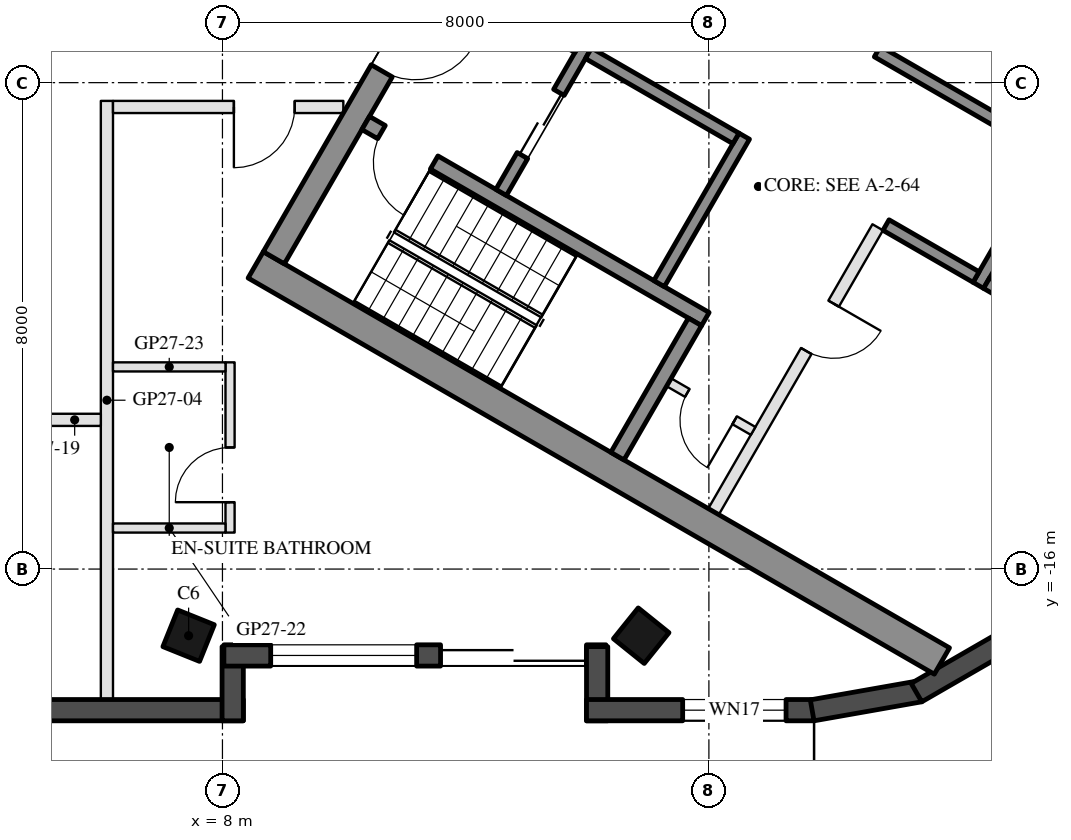
"""IFC4 building model, lengths in metres.
Left out: names, types, materials, properties, quantities, classifications, styles, units other than length and angle.
Written with IfcOpenShell. Run it as: python <this file> out.ifc"""

import sys

from ifc_helpers import new_model, si_unit, direction, frame, frame_2d, origin, origin_2d, place, context, subcontext, project, spatial, rectangle, hollow_rectangle, extrude, boolean, halfspace, element, fill, save


model = new_model("IFC4")
c1 = context("Model", 3, precision=1e-05, world=origin(), true_north=direction((0.0, 1.0)))
c2 = subcontext(c1, "Body", "Model", "MODEL_VIEW")
j1 = project(units=[si_unit("LENGTHUNIT", "METRE"), si_unit("PLANEANGLEUNIT", "RADIAN")], contexts=[c1])
p1 = place(None, origin())
s1 = spatial("IfcSite", under=j1, at=p1, CompositionType="ELEMENT")
p2 = place(p1, origin())
s2 = spatial("IfcBuilding", under=s1, at=p2, CompositionType="ELEMENT")
p3 = place(p2, frame((0.0, 0.0, 276.3)))
s3 = spatial("IfcBuildingStorey", under=s2, at=p3, CompositionType="ELEMENT", Elevation=276.3)
p4 = place(p3, frame((7.444, -17.096, 0.0), z_axis=(-0.060871062735, 0.151168564354, 0.986632038235), x_axis=(0.998135304591, 0.004721094283, 0.0608574153)))
e1 = element("IfcColumn", 1, at=p4, inside=s3, PredefinedType="COLUMN", context=c2, shape_type="SweptSolid", body=[
    boolean("DIFFERENCE", boolean("DIFFERENCE", extrude(hollow_rectangle(XDim=0.65, YDim=0.65, WallThickness=0.03, at=origin_2d()), origin(), (0.0, 0.0, 1.0), 3.75), halfspace(frame((0.0, 0.0, 0.04), z_axis=(0.0, 0.0, 1.0), x_axis=(1.0, 0.0, 0.0)), True)), halfspace(frame((0.0, 0.0, 3.71), z_axis=(0.0, 0.0, 1.0), x_axis=(1.0, 0.0, 0.0)), False)),
])
p5 = place(p3, frame((14.887, -17.096, 0.0), z_axis=(-0.121071080606, 0.15033532041, 0.981193704055), x_axis=(0.992604301044, 0.009512970783, 0.12102150609)))
e2 = element("IfcColumn", 2, at=p5, inside=s3, PredefinedType="COLUMN", context=c2, shape_type="SweptSolid", body=[
    boolean("DIFFERENCE", boolean("DIFFERENCE", extrude(hollow_rectangle(XDim=0.65, YDim=0.65, WallThickness=0.03, at=origin_2d()), origin(), (0.0, 0.0, 1.0), 3.771), halfspace(frame((0.0, 0.0, 0.047), z_axis=(0.0, 0.0, 1.0), x_axis=(1.0, 0.0, 0.0)), True)), halfspace(frame((0.0, 0.0, 3.724), z_axis=(0.0, 0.0, 1.0), x_axis=(1.0, 0.0, 0.0)), False)),
])
p6 = place(p3, frame((22.38, -12.921, 0.0), z_axis=(-0.190406849863, 0.109944185114, 0.975529347424), x_axis=(-0.499999219142, -0.866025854536, 1.1512328e-05)))
e3 = element("IfcColumn", 3, at=p6, inside=s3, PredefinedType="COLUMN", context=c2, shape_type="SweptSolid", body=[
    boolean("DIFFERENCE", boolean("DIFFERENCE", extrude(hollow_rectangle(XDim=2.0, YDim=2.0, WallThickness=0.05, at=origin_2d()), origin(), (0.0, 0.0, 1.0), 3.793), halfspace(frame((0.0, 0.0, 0.113), z_axis=(0.0, 0.0, 1.0), x_axis=(1.0, 0.0, 0.0)), True)), halfspace(frame((0.0, 0.0, 3.679), z_axis=(0.0, 0.0, 1.0), x_axis=(1.0, 0.0, 0.0)), False)),
])
p7 = place(p3, frame((-0.9, -18.321, 0.0), z_axis=(0.0, 0.0, 1.0), x_axis=(1.0, 0.0, 0.0)))
e4 = element("IfcWall", 4, at=p7, inside=s3, PredefinedType="SOLIDWALL", context=c2, shape_type="SweptSolid", body=[
    extrude(rectangle(XDim=9.243, YDim=0.35, at=frame_2d((4.622, 0.0))), origin(), (0.0, 0.0, 1.0), 3.55),
])
p8 = place(p7, frame((1.615, 0.0, 0.0)))
e5 = element("IfcOpeningElement", 5, at=p8, cuts=e4, PredefinedType="OPENING", context=c2, shape_type="SweptSolid", body=[
    extrude(rectangle(XDim=1.4, YDim=2.4, at=frame_2d((0.7, 1.2))), frame((0.0, 0.185, 0.0), z_axis=(0.0, -1.0, 0.0), x_axis=(1.0, 0.0, 0.0)), (0.0, 0.0, 1.0), 0.37),
])
p9 = place(p7, frame((4.5, 0.0, 0.0)))
e6 = element("IfcOpeningElement", 6, at=p9, cuts=e4, PredefinedType="OPENING", context=c2, shape_type="SweptSolid", body=[
    extrude(rectangle(XDim=1.5, YDim=2.4, at=frame_2d((0.75, 1.2))), frame((0.0, 0.185, 0.0), z_axis=(0.0, -1.0, 0.0), x_axis=(1.0, 0.0, 0.0)), (0.0, 0.0, 1.0), 0.37),
])
p10 = place(p3, frame((8.169, -18.496, 0.0), z_axis=(0.0, 0.0, 1.0), x_axis=(0.0, 1.0, 0.0)))
e7 = element("IfcWall", 7, at=p10, inside=s3, PredefinedType="SOLIDWALL", context=c2, shape_type="SweptSolid", body=[
    extrude(rectangle(XDim=1.22, YDim=0.35, at=frame_2d((0.61, 0.0))), origin(), (0.0, 0.0, 1.0), 3.55),
])
p11 = place(p3, frame((8.024, -17.421, 0.0), z_axis=(0.0, 0.0, 1.0), x_axis=(1.0, 0.0, 0.0)))
e8 = element("IfcWall", 8, at=p11, inside=s3, PredefinedType="SOLIDWALL", context=c2, shape_type="SweptSolid", body=[
    extrude(rectangle(XDim=6.283, YDim=0.35, at=frame_2d((3.142, 0.0))), origin(), (0.0, 0.0, 1.0), 3.55),
])
p12 = place(p11, frame((3.563, 0.0, 0.0)))
e9 = element("IfcOpeningElement", 9, at=p12, cuts=e8, PredefinedType="OPENING", context=c2, shape_type="SweptSolid", body=[
    extrude(rectangle(XDim=2.4, YDim=2.4, at=frame_2d((1.2, 1.2))), frame((0.0, 0.185, 0.0), z_axis=(0.0, -1.0, 0.0), x_axis=(1.0, 0.0, 0.0)), (0.0, 0.0, 1.0), 0.37),
])
p13 = place(p11, frame((0.77, 0.0, 0.3)))
e10 = element("IfcOpeningElement", 10, at=p13, cuts=e8, PredefinedType="OPENING", context=c2, shape_type="SweptSolid", body=[
    extrude(rectangle(XDim=2.4, YDim=2.65, at=frame_2d((1.2, 1.325))), frame((0.0, 0.185, 0.0), z_axis=(0.0, -1.0, 0.0), x_axis=(1.0, 0.0, 0.0)), (0.0, 0.0, 1.0), 0.37),
])
p14 = place(p3, frame((14.162, -17.276, 0.0), z_axis=(0.0, 0.0, 1.0), x_axis=(0.0, -1.0, 0.0)))
e11 = element("IfcWall", 11, at=p14, inside=s3, PredefinedType="SOLIDWALL", context=c2, shape_type="SweptSolid", body=[
    extrude(rectangle(XDim=1.22, YDim=0.35, at=frame_2d((0.61, 0.0))), origin(), (0.0, 0.0, 1.0), 3.55),
])
p15 = place(p3, frame((13.987, -18.321, 0.0), z_axis=(0.0, 0.0, 1.0), x_axis=(1.0, 0.0, 0.0)))
e12 = element("IfcWall", 12, at=p15, inside=s3, PredefinedType="SOLIDWALL", context=c2, shape_type="SweptSolid", body=[
    extrude(rectangle(XDim=3.742, YDim=0.35, at=frame_2d((1.871, 0.0))), origin(), (0.0, 0.0, 1.0), 3.55),
])
p16 = place(p15, frame((1.582, 0.0, 0.3)))
e13 = element("IfcOpeningElement", 13, at=p16, cuts=e12, PredefinedType="OPENING", context=c2, shape_type="SweptSolid", body=[
    extrude(rectangle(XDim=1.7, YDim=2.65, at=frame_2d((0.85, 1.325))), frame((0.0, 0.185, 0.0), z_axis=(0.0, -1.0, 0.0), x_axis=(1.0, 0.0, 0.0)), (0.0, 0.0, 1.0), 0.37),
])
p17 = place(p3, frame((17.698, -18.323, 0.0), z_axis=(0.0, 0.0, 1.0), x_axis=(0.984810858511, 0.173630564586, 0.0)))
e14 = element("IfcWall", 14, at=p17, inside=s3, PredefinedType="SOLIDWALL", context=c2, shape_type="SweptSolid", body=[
    extrude(rectangle(XDim=1.8, YDim=0.35, at=frame_2d((0.9, 0.0))), origin(), (0.0, 0.0, 1.0), 3.55),
])
p18 = place(p3, frame((19.414, -18.032, 0.0), z_axis=(0.0, 0.0, 1.0), x_axis=(0.866047807691, 0.499961193289, 0.0)))
e15 = element("IfcWall", 15, at=p18, inside=s3, PredefinedType="SOLIDWALL", context=c2, shape_type="SweptSolid", body=[
    extrude(rectangle(XDim=1.8, YDim=0.35, at=frame_2d((0.9, 0.0))), origin(), (0.0, 0.0, 1.0), 3.55),
])
for number, where, z_axis, x_axis in (
    (16, (8.547, -10.997, 0.0), (0.0, 0.0, 1.0), (0.866, -0.5, 0.0)),
    (17, (13.797, -1.903, 0.0), (0.0, 0.0, 1.0), (0.866, -0.5, 0.0)),
):
    element("IfcWall", number, at=place(p3, frame(where, z_axis=z_axis, x_axis=x_axis)), inside=s3, PredefinedType="SHEAR", context=c2, shape_type="SweptSolid", body=[
        extrude(rectangle(XDim=13.031, YDim=0.5, at=frame_2d((6.516, 0.0))), origin(), (0.0, 0.0, 1.0), 3.5),
    ])
p19 = place(p3, frame((8.845, -10.88, 0.0), z_axis=(0.0, 0.0, 1.0), x_axis=(0.500004234368, 0.866022959057, 0.0)))
e18 = element("IfcWall", 18, at=p19, inside=s3, PredefinedType="SHEAR", context=c2, shape_type="SweptSolid", body=[
    extrude(rectangle(XDim=10.0, YDim=0.4, at=frame_2d((5.0, 0.0))), origin(), (0.0, 0.0, 1.0), 3.5),
])
p20 = place(p19, frame((3.55, 0.0, 0.0)))
e19 = element("IfcOpeningElement", 19, at=p20, cuts=e18, PredefinedType="OPENING", context=c2, shape_type="SweptSolid", body=[
    extrude(rectangle(XDim=1.1, YDim=2.1, at=frame_2d((0.55, 1.05))), frame((0.0, 0.21, 0.0), z_axis=(0.0, -1.0, 0.0), x_axis=(1.0, 0.0, 0.0)), (0.0, 0.0, 1.0), 0.42),
])
p21 = place(p19, frame((5.85, 0.0, 0.0)))
e20 = element("IfcOpeningElement", 20, at=p21, cuts=e18, PredefinedType="OPENING", context=c2, shape_type="SweptSolid", body=[
    extrude(rectangle(XDim=1.4, YDim=2.1, at=frame_2d((0.7, 1.05))), frame((0.0, 0.21, 0.0), z_axis=(0.0, -1.0, 0.0), x_axis=(1.0, 0.0, 0.0)), (0.0, 0.0, 1.0), 0.42),
])
p22 = place(p3, frame((10.356, -8.664, 0.0), z_axis=(0.0, 0.0, 1.0), x_axis=(0.866028629588, -0.499994412703, 0.0)))
e21 = element("IfcWall", 21, at=p22, inside=s3, PredefinedType="SHEAR", context=c2, shape_type="SweptSolid", body=[
    extrude(rectangle(XDim=6.45, YDim=0.25, at=frame_2d((3.225, 0.0))), origin(), (0.0, 0.0, 1.0), 3.5),
])
p23 = place(p22, frame((0.3, 0.0, 0.0)))
e22 = element("IfcOpeningElement", 22, at=p23, cuts=e21, PredefinedType="OPENING", context=c2, shape_type="SweptSolid", body=[
    extrude(rectangle(XDim=1.0, YDim=2.1, at=frame_2d((0.5, 1.05))), frame((0.0, 0.135, 0.0), z_axis=(0.0, -1.0, 0.0), x_axis=(1.0, 0.0, 0.0)), (0.0, 0.0, 1.0), 0.27),
])
p24 = place(p3, frame((14.496, -14.143, 0.0), z_axis=(0.0, 0.0, 1.0), x_axis=(0.500062241894, 0.865989465428, 0.0)))
e23 = element("IfcWall", 23, at=p24, inside=s3, PredefinedType="SHEAR", context=c2, shape_type="SweptSolid", body=[
    extrude(rectangle(XDim=2.55, YDim=0.25, at=frame_2d((1.275, 0.0))), origin(), (0.0, 0.0, 1.0), 3.5),
])
p25 = place(p3, frame((15.181, -11.305, 0.0), z_axis=(0.0, 0.0, 1.0), x_axis=(0.49994636267, 0.866056369097, 0.0)))
e24 = element("IfcWall", 24, at=p25, inside=s3, PredefinedType="SHEAR", context=c2, shape_type="SweptSolid", body=[
    extrude(rectangle(XDim=2.8, YDim=0.2, at=frame_2d((1.4, 0.0))), origin(), (0.0, 0.0, 1.0), 3.5),
])
p26 = place(p3, frame((12.583, -9.805, 0.0), z_axis=(0.0, 0.0, 1.0), x_axis=(0.49994636267, 0.866056369097, 0.0)))
e25 = element("IfcWall", 25, at=p26, inside=s3, PredefinedType="SHEAR", context=c2, shape_type="SweptSolid", body=[
    extrude(rectangle(XDim=2.8, YDim=0.2, at=frame_2d((1.4, 0.0))), origin(), (0.0, 0.0, 1.0), 3.5),
])
p27 = place(p26, frame((0.7, 0.0, 0.0)))
e26 = element("IfcOpeningElement", 26, at=p27, cuts=e25, PredefinedType="OPENING", context=c2, shape_type="SweptSolid", body=[
    extrude(rectangle(XDim=1.2, YDim=2.1, at=frame_2d((0.6, 1.05))), frame((0.0, 0.11, 0.0), z_axis=(0.0, -1.0, 0.0), x_axis=(1.0, 0.0, 0.0)), (0.0, 0.0, 1.0), 0.22),
])
p28 = place(p3, frame((11.768, -6.217, 0.0), z_axis=(0.0, 0.0, 1.0), x_axis=(0.866050077142, -0.499957262057, 0.0)))
e27 = element("IfcWall", 27, at=p28, inside=s3, PredefinedType="SHEAR", context=c2, shape_type="SweptSolid", body=[
    extrude(rectangle(XDim=2.4, YDim=0.2, at=frame_2d((1.2, 0.0))), origin(), (0.0, 0.0, 1.0), 3.5),
])
p29 = place(p3, frame((14.02, -7.517, 0.0), z_axis=(0.0, 0.0, 1.0), x_axis=(0.866034573852, -0.49998411664, 0.0)))
e28 = element("IfcWall", 28, at=p29, inside=s3, PredefinedType="SHEAR", context=c2, shape_type="SweptSolid", body=[
    extrude(rectangle(XDim=2.8, YDim=0.2, at=frame_2d((1.4, 0.0))), origin(), (0.0, 0.0, 1.0), 3.5),
])
p30 = place(p3, frame((12.968, -4.138, 0.0), z_axis=(0.0, 0.0, 1.0), x_axis=(0.866028328073, -0.49999493495, 0.0)))
e29 = element("IfcWall", 29, at=p30, inside=s3, PredefinedType="SHEAR", context=c2, shape_type="SweptSolid", body=[
    extrude(rectangle(XDim=10.16, YDim=0.2, at=frame_2d((5.08, 0.0))), origin(), (0.0, 0.0, 1.0), 3.5),
])
p31 = place(p30, frame((0.62, 0.0, 0.0)))
e30 = element("IfcOpeningElement", 30, at=p31, cuts=e29, PredefinedType="OPENING", context=c2, shape_type="SweptSolid", body=[
    extrude(rectangle(XDim=1.1, YDim=2.1, at=frame_2d((0.55, 1.05))), frame((0.0, 0.11, 0.0), z_axis=(0.0, -1.0, 0.0), x_axis=(1.0, 0.0, 0.0)), (0.0, 0.0, 1.0), 0.22),
])
p32 = place(p30, frame((5.8, 0.0, 0.0)))
e31 = element("IfcOpeningElement", 31, at=p32, cuts=e29, PredefinedType="OPENING", context=c2, shape_type="SweptSolid", body=[
    extrude(rectangle(XDim=0.9, YDim=2.1, at=frame_2d((0.45, 1.05))), frame((0.0, 0.11, 0.0), z_axis=(0.0, -1.0, 0.0), x_axis=(1.0, 0.0, 0.0)), (0.0, 0.0, 1.0), 0.22),
])
p33 = place(p3, frame((20.43, -11.333, 0.0), z_axis=(0.0, 0.0, 1.0), x_axis=(0.500001309137, 0.866024647952, 0.0)))
e32 = element("IfcWall", 32, at=p33, inside=s3, PredefinedType="SHEAR", context=c2, shape_type="SweptSolid", body=[
    extrude(rectangle(XDim=2.4, YDim=0.2, at=frame_2d((1.2, 0.0))), origin(), (0.0, 0.0, 1.0), 3.5),
])
p34 = place(p33, frame((0.85, 0.0, 0.0)))
e33 = element("IfcOpeningElement", 33, at=p34, cuts=e32, PredefinedType="OPENING", context=c2, shape_type="SweptSolid", body=[
    extrude(rectangle(XDim=0.9, YDim=2.1, at=frame_2d((0.45, 1.05))), frame((0.0, 0.11, 0.0), z_axis=(0.0, -1.0, 0.0), x_axis=(1.0, 0.0, 0.0)), (0.0, 0.0, 1.0), 0.22),
])
p35 = place(p3, frame((18.913, -10.342, 0.0), z_axis=(0.0, 0.0, 1.0), x_axis=(0.866038183914, -0.499977863513, 0.0)))
e34 = element("IfcWall", 34, at=p35, inside=s3, PredefinedType="SHEAR", context=c2, shape_type="SweptSolid", body=[
    extrude(rectangle(XDim=1.71, YDim=0.2, at=frame_2d((0.855, 0.0))), origin(), (0.0, 0.0, 1.0), 3.5),
])
p36 = place(p3, frame((20.567, -11.297, 0.0), z_axis=(0.0, 0.0, 1.0), x_axis=(0.866094443108, -0.499880401313, 0.0)))
e35 = element("IfcWall", 35, at=p36, inside=s3, PredefinedType="SHEAR", context=c2, shape_type="SweptSolid", body=[
    extrude(rectangle(XDim=1.383, YDim=0.2, at=frame_2d((0.691, 0.0))), origin(), (0.0, 0.0, 1.0), 3.5),
])
p37 = place(p3, frame((16.076, -15.055, 0.0), z_axis=(0.0, 0.0, 1.0), x_axis=(0.499995103361, 0.866028230842, 0.0)))
e36 = element("IfcWall", 36, at=p37, inside=s3, PredefinedType="PARTITIONING", context=c2, shape_type="SweptSolid", body=[
    extrude(rectangle(XDim=5.4, YDim=0.2, at=frame_2d((2.7, 0.0))), origin(), (0.0, 0.0, 1.0), 3.5),
])
p38 = place(p37, frame((3.05, 0.0, 0.0)))
e37 = element("IfcOpeningElement", 37, at=p38, cuts=e36, PredefinedType="OPENING", context=c2, shape_type="SweptSolid", body=[
    extrude(rectangle(XDim=0.9, YDim=2.1, at=frame_2d((0.45, 1.05))), frame((0.0, 0.11, 0.0), z_axis=(0.0, -1.0, 0.0), x_axis=(1.0, 0.0, 0.0)), (0.0, 0.0, 1.0), 0.22),
])
p39 = place(p3, frame((15.342, -12.928, 0.0), z_axis=(0.0, 0.0, 1.0), x_axis=(0.865989903783, -0.500061482766, 0.0)))
e38 = element("IfcWall", 38, at=p39, inside=s3, PredefinedType="PARTITIONING", context=c2, shape_type="SweptSolid", body=[
    extrude(rectangle(XDim=1.6, YDim=0.15, at=frame_2d((0.8, 0.0))), origin(), (0.0, 0.0, 1.0), 3.5),
])
p40 = place(p39, frame((0.35, 0.0, 0.0)))
e39 = element("IfcOpeningElement", 39, at=p40, cuts=e38, PredefinedType="OPENING", context=c2, shape_type="SweptSolid", body=[
    extrude(rectangle(XDim=0.9, YDim=2.1, at=frame_2d((0.45, 1.05))), frame((0.0, 0.085, 0.0), z_axis=(0.0, -1.0, 0.0), x_axis=(1.0, 0.0, 0.0)), (0.0, 0.0, 1.0), 0.17),
])
p41 = place(p3, frame((6.1, -18.146, 0.0), z_axis=(0.0, 0.0, 1.0), x_axis=(0.0, 1.0, 0.0)))
e40 = element("IfcWall", 40, at=p41, inside=s3, PredefinedType="PARTITIONING", context=c2, shape_type="SweptSolid", body=[
    extrude(rectangle(XDim=9.846, YDim=0.2, at=frame_2d((4.923, 0.0))), origin(), (0.0, 0.0, 1.0), 3.1),
])
p42 = place(p3, frame((6.0, -13.546, 0.0), z_axis=(0.0, 0.0, 1.0), x_axis=(-1.0, 0.0, 0.0)))
e41 = element("IfcWall", 41, at=p42, inside=s3, PredefinedType="PARTITIONING", context=c2, shape_type="SweptSolid", body=[
    extrude(rectangle(XDim=3.586, YDim=0.2, at=frame_2d((1.793, 0.0))), origin(), (0.0, 0.0, 1.0), 3.05),
])
p43 = place(p42, frame((1.293, 0.0, 0.0)))
e42 = element("IfcOpeningElement", 42, at=p43, cuts=e41, PredefinedType="OPENING", context=c2, shape_type="SweptSolid", body=[
    extrude(rectangle(XDim=1.0, YDim=2.1, at=frame_2d((0.5, 1.05))), frame((0.0, 0.11, 0.0), z_axis=(0.0, -1.0, 0.0), x_axis=(1.0, 0.0, 0.0)), (0.0, 0.0, 1.0), 0.22),
])
p44 = place(p3, frame((9.988, -8.4, 0.0), z_axis=(0.0, 0.0, 1.0), x_axis=(-1.0, 0.0, 0.0)))
e43 = element("IfcWall", 43, at=p44, inside=s3, PredefinedType="PARTITIONING", context=c2, shape_type="SweptSolid", body=[
    extrude(rectangle(XDim=3.788, YDim=0.2, at=frame_2d((1.894, 0.0))), origin(), (0.0, 0.0, 1.0), 3.05),
])
p45 = place(p44, frame((0.8, 0.0, 0.0)))
e44 = element("IfcOpeningElement", 44, at=p45, cuts=e43, PredefinedType="OPENING", context=c2, shape_type="SweptSolid", body=[
    extrude(rectangle(XDim=1.0, YDim=2.1, at=frame_2d((0.5, 1.05))), frame((0.0, 0.11, 0.0), z_axis=(0.0, -1.0, 0.0), x_axis=(1.0, 0.0, 0.0)), (0.0, 0.0, 1.0), 0.22),
])
p46 = place(p3, frame((8.125, -15.4, 0.0), z_axis=(0.0, 0.0, 1.0), x_axis=(0.0, 1.0, 0.0)))
e45 = element("IfcWall", 45, at=p46, inside=s3, PredefinedType="PARTITIONING", context=c2, shape_type="SweptSolid", body=[
    extrude(rectangle(XDim=2.8, YDim=0.15, at=frame_2d((1.4, 0.0))), origin(), (0.0, 0.0, 1.0), 3.55),
])
p47 = place(p46, frame((0.5, 0.0, 0.0)))
e46 = element("IfcOpeningElement", 46, at=p47, cuts=e45, PredefinedType="OPENING", context=c2, shape_type="SweptSolid", body=[
    extrude(rectangle(XDim=0.9, YDim=2.1, at=frame_2d((0.45, 1.05))), frame((0.0, 0.085, 0.0), z_axis=(0.0, -1.0, 0.0), x_axis=(1.0, 0.0, 0.0)), (0.0, 0.0, 1.0), 0.17),
])
for number, where, z_axis, x_axis in (
    (47, (6.2, -15.325, 0.0), (0.0, 0.0, 1.0), (1.0, 0.0, 0.0)),
    (48, (6.2, -12.675, 0.0), (0.0, 0.0, 1.0), (1.0, 0.0, 0.0)),
):
    element("IfcWall", number, at=place(p3, frame(where, z_axis=z_axis, x_axis=x_axis)), inside=s3, PredefinedType="PARTITIONING", context=c2, shape_type="SweptSolid", body=[
        extrude(rectangle(XDim=1.85, YDim=0.15, at=frame_2d((0.925, 0.0))), origin(), (0.0, 0.0, 1.0), 3.05),
    ])
p48 = place(p12, frame((2.4, 0.0, 0.0), z_axis=(0.0, 0.0, 1.0), x_axis=(-1.0, 0.0, 0.0)))
e49 = element("IfcDoor", 49, at=p48, inside=s3, OperationType="SLIDING_TO_LEFT", PredefinedType="DOOR", context=c2, shape_type="SweptSolid", body=[
    extrude(rectangle(XDim=2.4, YDim=2.4, at=frame_2d((1.2, 1.2))), frame((0.0, 0.025, 0.0), z_axis=(0.0, -1.0, 0.0), x_axis=(1.0, 0.0, 0.0)), (0.0, 0.0, 1.0), 0.05),
])
fill(e9, e49)
p49 = place(p13, origin())
e50 = element("IfcWindow", 50, at=p49, inside=s3, PartitioningType="SINGLE_PANEL", PredefinedType="WINDOW", context=c2, shape_type="SweptSolid", body=[
    extrude(rectangle(XDim=2.4, YDim=2.65, at=frame_2d((1.2, 1.325))), frame((0.0, 0.03, 0.0), z_axis=(0.0, -1.0, 0.0), x_axis=(1.0, 0.0, 0.0)), (0.0, 0.0, 1.0), 0.06),
])
fill(e10, e50)
p50 = place(p16, origin())
e51 = element("IfcWindow", 51, at=p50, inside=s3, PartitioningType="SINGLE_PANEL", PredefinedType="WINDOW", context=c2, shape_type="SweptSolid", body=[
    extrude(rectangle(XDim=1.7, YDim=2.65, at=frame_2d((0.85, 1.325))), frame((0.0, 0.03, 0.0), z_axis=(0.0, -1.0, 0.0), x_axis=(1.0, 0.0, 0.0)), (0.0, 0.0, 1.0), 0.06),
])
fill(e13, e51)
p51 = place(p27, origin())
e52 = element("IfcDoor", 52, at=p51, inside=s3, OperationType="DOUBLE_DOOR_SLIDING", PredefinedType="DOOR", context=c2, shape_type="SweptSolid", body=[
    extrude(rectangle(XDim=1.2, YDim=2.1, at=frame_2d((0.6, 1.05))), frame((0.0, 0.025, 0.0), z_axis=(0.0, -1.0, 0.0), x_axis=(1.0, 0.0, 0.0)), (0.0, 0.0, 1.0), 0.05),
])
fill(e26, e52)
p52 = place(p40, frame((0.9, 0.0, 0.0), z_axis=(0.0, 0.0, 1.0), x_axis=(-1.0, 0.0, 0.0)))
e53 = element("IfcDoor", 53, at=p52, inside=s3, OperationType="SINGLE_SWING_LEFT", PredefinedType="DOOR", context=c2, shape_type="SweptSolid", body=[
    extrude(rectangle(XDim=0.9, YDim=2.1, at=frame_2d((0.45, 1.05))), frame((0.0, 0.025, 0.0), z_axis=(0.0, -1.0, 0.0), x_axis=(1.0, 0.0, 0.0)), (0.0, 0.0, 1.0), 0.05),
])
fill(e39, e53)
p53 = place(p32, origin())
e54 = element("IfcDoor", 54, at=p53, inside=s3, OperationType="SINGLE_SWING_LEFT", PredefinedType="DOOR", context=c2, shape_type="SweptSolid", body=[
    extrude(rectangle(XDim=0.9, YDim=2.1, at=frame_2d((0.45, 1.05))), frame((0.0, 0.025, 0.0), z_axis=(0.0, -1.0, 0.0), x_axis=(1.0, 0.0, 0.0)), (0.0, 0.0, 1.0), 0.05),
])
fill(e31, e54)
p54 = place(p38, frame((0.9, 0.0, 0.0), z_axis=(0.0, 0.0, 1.0), x_axis=(-1.0, 0.0, 0.0)))
e55 = element("IfcDoor", 55, at=p54, inside=s3, OperationType="SINGLE_SWING_LEFT", PredefinedType="DOOR", context=c2, shape_type="SweptSolid", body=[
    extrude(rectangle(XDim=0.9, YDim=2.1, at=frame_2d((0.45, 1.05))), frame((0.0, 0.025, 0.0), z_axis=(0.0, -1.0, 0.0), x_axis=(1.0, 0.0, 0.0)), (0.0, 0.0, 1.0), 0.05),
])
fill(e37, e55)
p55 = place(p20, frame((1.1, 0.0, 0.0), z_axis=(0.0, 0.0, 1.0), x_axis=(-1.0, 0.0, 0.0)))
e56 = element("IfcDoor", 56, at=p55, inside=s3, OperationType="SINGLE_SWING_LEFT", PredefinedType="DOOR", context=c2, shape_type="SweptSolid", body=[
    extrude(rectangle(XDim=1.1, YDim=2.1, at=frame_2d((0.55, 1.05))), frame((0.0, 0.025, 0.0), z_axis=(0.0, -1.0, 0.0), x_axis=(1.0, 0.0, 0.0)), (0.0, 0.0, 1.0), 0.05),
])
fill(e19, e56)
p56 = place(p23, frame((1.0, 0.0, 0.0), z_axis=(0.0, 0.0, 1.0), x_axis=(-1.0, 0.0, 0.0)))
e57 = element("IfcDoor", 57, at=p56, inside=s3, OperationType="SINGLE_SWING_LEFT", PredefinedType="DOOR", context=c2, shape_type="SweptSolid", body=[
    extrude(rectangle(XDim=1.0, YDim=2.1, at=frame_2d((0.5, 1.05))), frame((0.0, 0.025, 0.0), z_axis=(0.0, -1.0, 0.0), x_axis=(1.0, 0.0, 0.0)), (0.0, 0.0, 1.0), 0.05),
])
fill(e22, e57)
p57 = place(p47, origin())
e58 = element("IfcDoor", 58, at=p57, inside=s3, OperationType="SINGLE_SWING_LEFT", PredefinedType="DOOR", context=c2, shape_type="SweptSolid", body=[
    extrude(rectangle(XDim=0.9, YDim=2.1, at=frame_2d((0.45, 1.05))), frame((0.0, 0.025, 0.0), z_axis=(0.0, -1.0, 0.0), x_axis=(1.0, 0.0, 0.0)), (0.0, 0.0, 1.0), 0.05),
])
fill(e46, e58)
p58 = place(p45, origin())
e59 = element("IfcDoor", 59, at=p58, inside=s3, OperationType="SINGLE_SWING_RIGHT", PredefinedType="DOOR", context=c2, shape_type="SweptSolid", body=[
    extrude(rectangle(XDim=1.0, YDim=2.1, at=frame_2d((0.5, 1.05))), frame((0.0, 0.025, 0.0), z_axis=(0.0, -1.0, 0.0), x_axis=(1.0, 0.0, 0.0)), (0.0, 0.0, 1.0), 0.05),
])
fill(e44, e59)
save(model, sys.argv[1])
